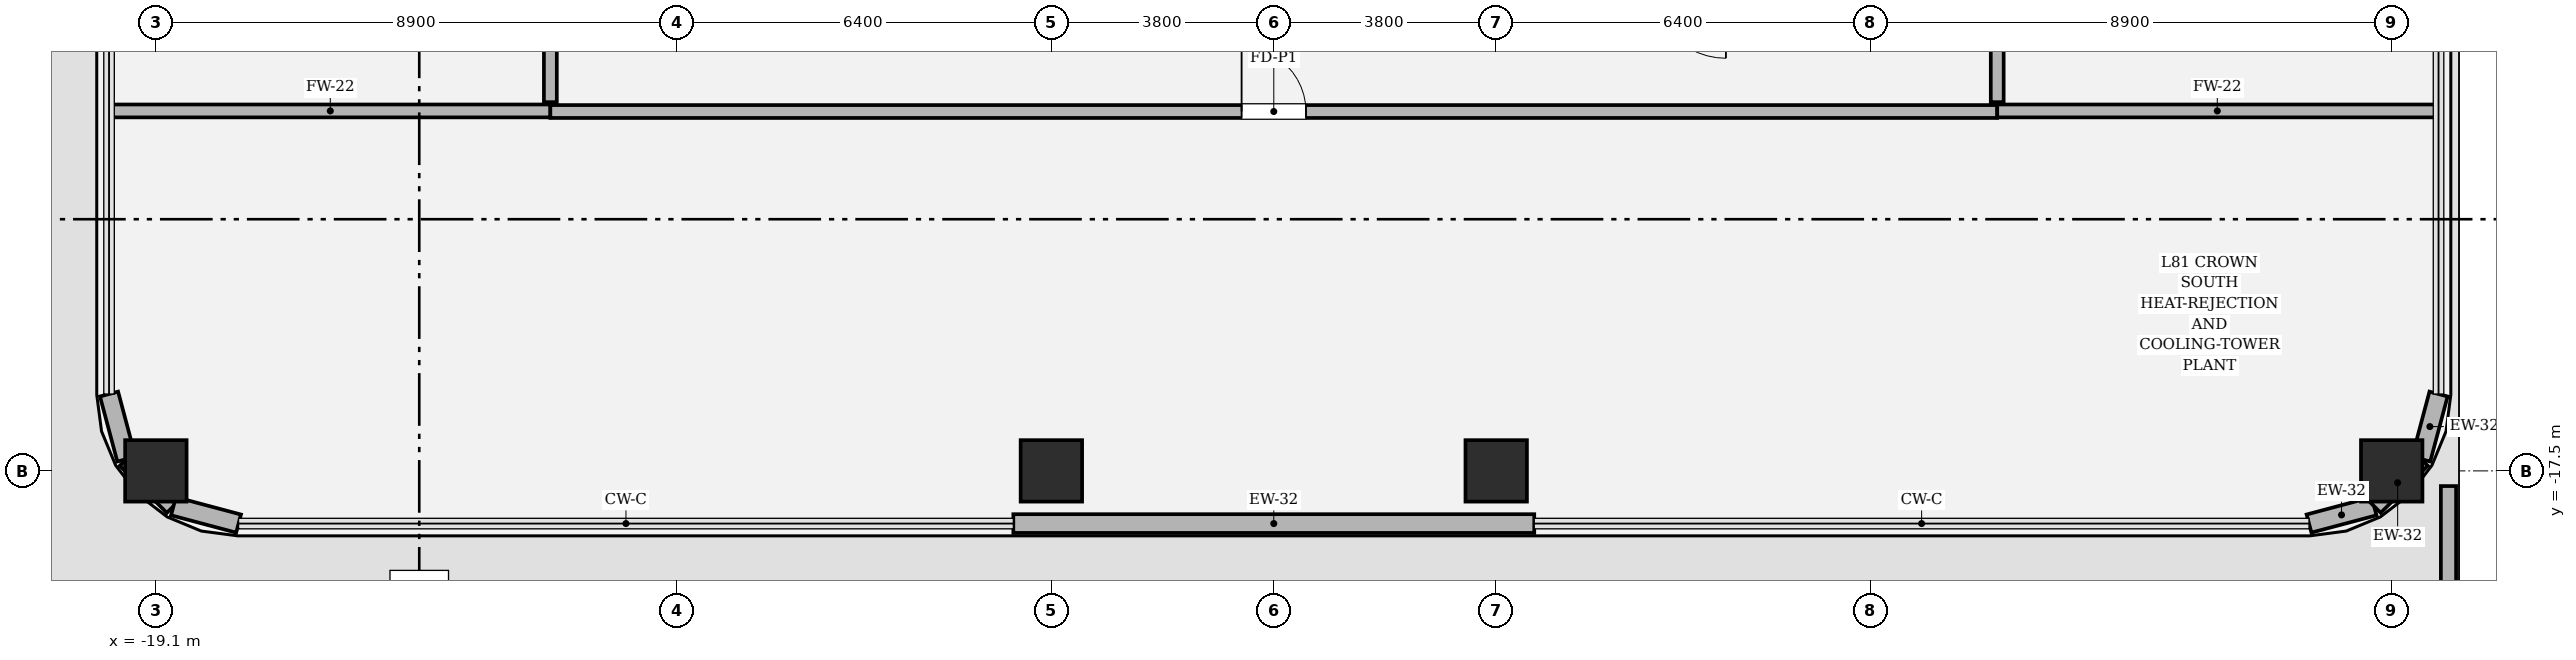
"""IFC4 building model, lengths in metres.
Left out: names, types, materials, properties, quantities, classifications, styles, units other than length and angle.
Written with IfcOpenShell. Run it as: python <this file> out.ifc"""

import sys

from ifc_helpers import new_model, si_unit, direction, frame, frame_2d, origin, origin_2d, place, context, subcontext, project, spatial, rectangle, hollow_rectangle, extrude, element, fill, save


model = new_model("IFC4")
c1 = context("Model", 3, precision=1e-05, world=origin(), true_north=direction((0.0, 1.0)))
c2 = subcontext(c1, "Body", "Model", "MODEL_VIEW")
j1 = project(units=[si_unit("LENGTHUNIT", "METRE"), si_unit("PLANEANGLEUNIT", "RADIAN")], contexts=[c1])
p1 = place(None, origin())
s1 = spatial("IfcSite", under=j1, at=p1, CompositionType="ELEMENT")
p2 = place(p1, origin())
s2 = spatial("IfcBuilding", under=s1, at=p2, CompositionType="ELEMENT")
p3 = place(p2, frame((0.0, 0.0, 343.8)))
s3 = spatial("IfcBuildingStorey", under=s2, at=p3, CompositionType="ELEMENT", Elevation=343.8)
for number, where, z_axis, x_axis in (
    (1, (-19.1, -17.5, 0.0), (0.0, 0.0, 1.0), (1.0, 0.0, 0.0)),
    (2, (-3.8, -17.5, 0.0), (0.0, 0.0, 1.0), (1.0, 0.0, 0.0)),
    (3, (3.8, -17.5, 0.0), (0.0, 0.0, 1.0), (1.0, 0.0, 0.0)),
    (4, (19.1, -17.5, 0.0), (0.0, 0.0, 1.0), (1.0, 0.0, 0.0)),
):
    element("IfcColumn", number, at=place(p3, frame(where, z_axis=z_axis, x_axis=x_axis)), inside=s3, PredefinedType="COLUMN", context=c2, shape_type="SweptSolid", body=[
        extrude(hollow_rectangle(XDim=1.05, YDim=1.05, WallThickness=0.03, at=origin_2d()), origin(), (0.0, 0.0, 1.0), 4.5),
    ])
p4 = place(p3, frame((-4.45, -18.4, 0.0), z_axis=(0.0, 0.0, 1.0), x_axis=(1.0, 0.0, 0.0)))
e5 = element("IfcWall", 5, at=p4, inside=s3, PredefinedType="SOLIDWALL", context=c2, shape_type="SweptSolid", body=[
    extrude(rectangle(XDim=8.9, YDim=0.32, at=frame_2d((4.45, 0.0))), origin(), (0.0, 0.0, 1.0), 4.28),
])
p5 = place(p3, frame((17.687, -18.4, 0.0), z_axis=(0.0, 0.0, 1.0), x_axis=(0.966322910406, 0.257332533551, 0.0)))
e6 = element("IfcWall", 6, at=p5, inside=s3, PredefinedType="SOLIDWALL", context=c2, shape_type="SweptSolid", body=[
    extrude(rectangle(XDim=1.151, YDim=0.32, at=frame_2d((0.575, 0.0))), origin(), (0.0, 0.0, 1.0), 4.28),
])
p6 = place(p3, frame((18.799, -18.104, 0.0), z_axis=(0.0, 0.0, 1.0), x_axis=(0.707106781187, 0.707106781187, 0.0)))
e7 = element("IfcWall", 7, at=p6, inside=s3, PredefinedType="SOLIDWALL", context=c2, shape_type="SweptSolid", body=[
    extrude(rectangle(XDim=1.138, YDim=0.32, at=frame_2d((0.569, 0.0))), origin(), (0.0, 0.0, 1.0), 2.954),
])
for number, where, z_axis, x_axis in (
    (8, (19.604, -17.299, 0.0), (0.0, 0.0, 1.0), (0.257, 0.966, 0.0)),
    (9, (-19.9, -16.187, 0.0), (0.0, 0.0, 1.0), (0.257, -0.966, 0.0)),
):
    element("IfcWall", number, at=place(p3, frame(where, z_axis=z_axis, x_axis=x_axis)), inside=s3, PredefinedType="SOLIDWALL", context=c2, shape_type="SweptSolid", body=[
        extrude(rectangle(XDim=1.151, YDim=0.32, at=frame_2d((0.575, 0.0))), origin(), (0.0, 0.0, 1.0), 4.28),
    ])
p7 = place(p3, frame((-19.604, -17.299, 0.0), z_axis=(0.0, 0.0, 1.0), x_axis=(0.707106781187, -0.707106781187, 0.0)))
e10 = element("IfcWall", 10, at=p7, inside=s3, PredefinedType="SOLIDWALL", context=c2, shape_type="SweptSolid", body=[
    extrude(rectangle(XDim=1.138, YDim=0.32, at=frame_2d((0.569, 0.0))), origin(), (0.0, 0.0, 1.0), 2.954),
])
p8 = place(p3, frame((-18.799, -18.104, 0.0), z_axis=(0.0, 0.0, 1.0), x_axis=(0.966322910406, -0.257332533551, 0.0)))
e11 = element("IfcWall", 11, at=p8, inside=s3, PredefinedType="SOLIDWALL", context=c2, shape_type="SweptSolid", body=[
    extrude(rectangle(XDim=1.151, YDim=0.32, at=frame_2d((0.575, 0.0))), origin(), (0.0, 0.0, 1.0), 4.28),
])
p9 = place(p3, frame((20.07, -20.238, 0.0), z_axis=(0.0, 0.0, 1.0), x_axis=(0.0, 1.0, 0.0)))
e12 = element("IfcWall", 12, at=p9, inside=s3, PredefinedType="PARAPET", context=c2, shape_type="SweptSolid", body=[
    extrude(rectangle(XDim=2.479, YDim=0.26, at=frame_2d((1.24, 0.0))), origin(), (0.0, 0.0, 1.0), 1.2),
])
p10 = place(p3, frame((-19.88, -11.35, 0.0), z_axis=(0.0, 0.0, 1.0), x_axis=(1.0, 0.0, 0.0)))
e13 = element("IfcWall", 13, at=p10, inside=s3, PredefinedType="SOLIDWALL", context=c2, shape_type="SweptSolid", body=[
    extrude(rectangle(XDim=7.52, YDim=0.22, at=frame_2d((3.76, 0.0))), origin(), (0.0, 0.0, 1.0), 2.954),
])
p11 = place(p3, frame((-12.36, -11.36, 0.0), z_axis=(0.0, 0.0, 1.0), x_axis=(1.0, 0.0, 0.0)))
e14 = element("IfcWall", 14, at=p11, inside=s3, PredefinedType="SOLIDWALL", context=c2, shape_type="SweptSolid", body=[
    extrude(rectangle(XDim=24.72, YDim=0.22, at=frame_2d((12.36, 0.0))), origin(), (0.0, 0.0, 1.0), 2.954),
])
p12 = place(p11, frame((11.81, 0.0, 0.0)))
e15 = element("IfcOpeningElement", 15, at=p12, cuts=e14, PredefinedType="OPENING", context=c2, shape_type="SweptSolid", body=[
    extrude(rectangle(XDim=1.1, YDim=2.2, at=frame_2d((0.55, 1.1))), frame((0.0, 0.12, 0.0), z_axis=(0.0, -1.0, 0.0), x_axis=(1.0, 0.0, 0.0)), (0.0, 0.0, 1.0), 0.24),
])
p13 = place(p3, frame((12.36, -11.35, 0.0), z_axis=(0.0, 0.0, 1.0), x_axis=(1.0, 0.0, 0.0)))
e16 = element("IfcWall", 16, at=p13, inside=s3, PredefinedType="SOLIDWALL", context=c2, shape_type="SweptSolid", body=[
    extrude(rectangle(XDim=7.52, YDim=0.22, at=frame_2d((3.76, 0.0))), origin(), (0.0, 0.0, 1.0), 2.954),
])
p14 = place(p3, frame((-12.36, 11.2, 0.0), z_axis=(0.0, 0.0, 1.0), x_axis=(0.0, -1.0, 0.0)))
e17 = element("IfcWall", 17, at=p14, inside=s3, PredefinedType="SOLIDWALL", context=c2, shape_type="SweptSolid", body=[
    extrude(rectangle(XDim=22.4, YDim=0.22, at=frame_2d((11.2, 0.0))), origin(), (0.0, 0.0, 1.0), 2.954),
])
p15 = place(p14, frame((10.65, 0.0, 0.0)))
e18 = element("IfcOpeningElement", 18, at=p15, cuts=e17, PredefinedType="OPENING", context=c2, shape_type="SweptSolid", body=[
    extrude(rectangle(XDim=1.1, YDim=2.2, at=frame_2d((0.55, 1.1))), frame((0.0, 0.12, 0.0), z_axis=(0.0, -1.0, 0.0), x_axis=(1.0, 0.0, 0.0)), (0.0, 0.0, 1.0), 0.24),
])
p16 = place(p3, frame((12.36, -11.2, 0.0), z_axis=(0.0, 0.0, 1.0), x_axis=(0.0, 1.0, 0.0)))
e19 = element("IfcWall", 19, at=p16, inside=s3, PredefinedType="SOLIDWALL", context=c2, shape_type="SweptSolid", body=[
    extrude(rectangle(XDim=22.4, YDim=0.22, at=frame_2d((11.2, 0.0))), origin(), (0.0, 0.0, 1.0), 2.954),
])
p17 = place(p16, frame((10.65, 0.0, 0.0)))
e20 = element("IfcOpeningElement", 20, at=p17, cuts=e19, PredefinedType="OPENING", context=c2, shape_type="SweptSolid", body=[
    extrude(rectangle(XDim=1.1, YDim=2.2, at=frame_2d((0.55, 1.1))), frame((0.0, 0.12, 0.0), z_axis=(0.0, -1.0, 0.0), x_axis=(1.0, 0.0, 0.0)), (0.0, 0.0, 1.0), 0.24),
])
p18 = place(p12, origin())
e21 = element("IfcDoor", 21, at=p18, inside=s3, OperationType="SINGLE_SWING_LEFT", PredefinedType="DOOR", context=c2, shape_type="SweptSolid", body=[
    extrude(rectangle(XDim=1.1, YDim=2.2, at=frame_2d((0.55, 1.1))), frame((0.0, 0.025, 0.0), z_axis=(0.0, -1.0, 0.0), x_axis=(1.0, 0.0, 0.0)), (0.0, 0.0, 1.0), 0.05),
])
fill(e15, e21)
save(model, sys.argv[1])
